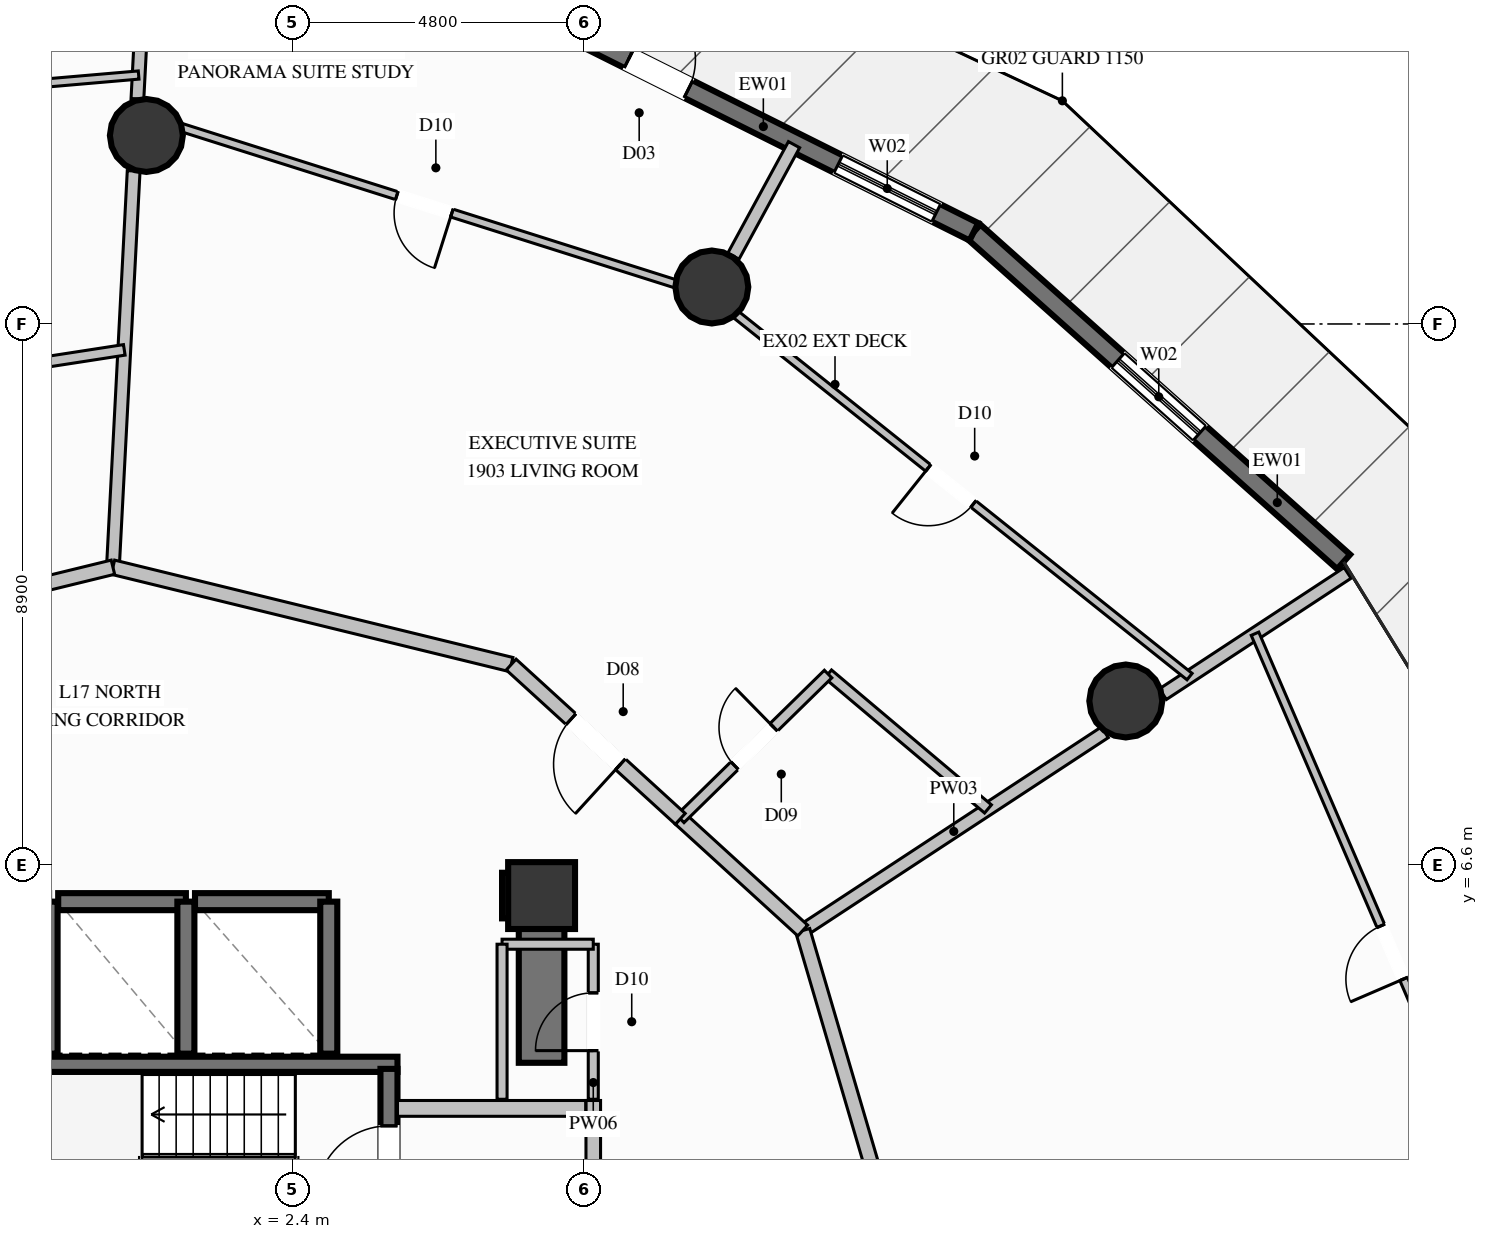
"""IFC4 building model, lengths in metres.
Left out: names, types, materials, properties, quantities, classifications, styles, units other than length and angle.
Written with IfcOpenShell. Run it as: python <this file> out.ifc"""

import sys

from ifc_helpers import new_model, si_unit, direction, frame, frame_2d, origin, origin_2d, place, context, subcontext, project, spatial, rectangle, circle, extrude, element, fill, save


model = new_model("IFC4")
c1 = context("Model", 3, precision=1e-05, world=origin(), true_north=direction((0.0, 1.0)))
c2 = subcontext(c1, "Body", "Model", "MODEL_VIEW")
j1 = project(units=[si_unit("LENGTHUNIT", "METRE"), si_unit("PLANEANGLEUNIT", "RADIAN")], contexts=[c1])
p1 = place(None, origin())
s1 = spatial("IfcSite", under=j1, at=p1, CompositionType="ELEMENT")
p2 = place(p1, origin())
s2 = spatial("IfcBuilding", under=s1, at=p2, CompositionType="ELEMENT")
p3 = place(p2, frame((0.0, 0.0, 71.6)))
s3 = spatial("IfcBuildingStorey", under=s2, at=p3, CompositionType="ELEMENT", Elevation=71.6)
p4 = place(p3, frame((6.5, 6.1, 0.0), z_axis=(0.0, 0.0, 1.0), x_axis=(1.0, 0.0, 0.0)))
e1 = element("IfcColumn", 1, at=p4, inside=s3, PredefinedType="COLUMN", context=c2, shape_type="SweptSolid", body=[
    extrude(rectangle(XDim=1.1, YDim=1.1, at=origin_2d()), origin(), (0.0, 0.0, 1.0), 3.6),
])
p5 = place(p3, frame((-4.13, 3.325, 0.0), z_axis=(0.0, 0.0, 1.0), x_axis=(1.0, 0.0, 0.0)))
e2 = element("IfcWall", 2, at=p5, inside=s3, PredefinedType="SOLIDWALL", context=c2, shape_type="SweptSolid", body=[
    extrude(rectangle(XDim=8.26, YDim=0.25, at=frame_2d((4.13, 0.0))), origin(), (0.0, 0.0, 1.0), 3.6),
])
p6 = place(p3, frame((5.85, 6.1, 0.0), z_axis=(0.0, 0.0, 1.0), x_axis=(1.0, 0.0, 0.0)))
e3 = element("IfcWall", 3, at=p6, inside=s3, PredefinedType="SHEAR", context=c2, shape_type="SweptSolid", body=[
    extrude(rectangle(XDim=0.275, YDim=0.75, at=frame_2d((0.137, 0.0))), origin(), (0.0, 0.0, 1.0), 3.6),
])
p7 = place(p3, frame((6.5, 3.35, 0.0), z_axis=(0.0, 0.0, 1.0), x_axis=(0.0, 1.0, 0.0)))
e4 = element("IfcWall", 4, at=p7, inside=s3, PredefinedType="SHEAR", context=c2, shape_type="SweptSolid", body=[
    extrude(rectangle(XDim=3.125, YDim=0.75, at=frame_2d((1.562, 0.0))), origin(), (0.0, 0.0, 1.0), 3.6),
])
for number, where, z_axis, x_axis in (
    (5, (16.108, 9.3, 0.0), (0.0, 0.0, 1.0), (1.0, 0.0, 0.0)),
    (6, (9.3, 16.108, 0.0), (0.0, 0.0, 1.0), (1.0, 0.0, 0.0)),
    (7, (0.0, 18.6, 0.0), (0.0, 0.0, 1.0), (1.0, 0.0, 0.0)),
):
    element("IfcColumn", number, at=place(p3, frame(where, z_axis=z_axis, x_axis=x_axis)), inside=s3, PredefinedType="COLUMN", context=c2, shape_type="SweptSolid", body=[
        extrude(circle(Radius=0.6, at=origin_2d()), origin(), (0.0, 0.0, 1.0), 3.6),
    ])
p8 = place(p3, frame((13.61, 17.016, 0.0), z_axis=(0.0, 0.0, 1.0), x_axis=(0.746077425908, -0.665859200245, 0.0)))
e8 = element("IfcWall", 8, at=p8, inside=s3, PredefinedType="SOLIDWALL", context=c2, shape_type="SweptSolid", body=[
    extrude(rectangle(XDim=8.15, YDim=0.32, at=frame_2d((4.075, 0.0))), origin(), (0.0, 0.0, 1.0), 3.34),
])
p9 = place(p8, frame((3.175, 0.0, 0.35)))
e9 = element("IfcOpeningElement", 9, at=p9, cuts=e8, PredefinedType="OPENING", context=c2, shape_type="SweptSolid", body=[
    extrude(rectangle(XDim=1.8, YDim=2.6, at=frame_2d((0.9, 1.3))), frame((0.0, 0.17, 0.0), z_axis=(0.0, -1.0, 0.0), x_axis=(1.0, 0.0, 0.0)), (0.0, 0.0, 1.0), 0.34),
])
p10 = place(p3, frame((6.085, 20.776, 0.0), z_axis=(0.0, 0.0, 1.0), x_axis=(0.894560654667, -0.446946568532, 0.0)))
e10 = element("IfcWall", 10, at=p10, inside=s3, PredefinedType="SOLIDWALL", context=c2, shape_type="SweptSolid", body=[
    extrude(rectangle(XDim=8.412, YDim=0.32, at=frame_2d((4.206, 0.0))), origin(), (0.0, 0.0, 1.0), 3.34),
])
p11 = place(p10, frame((5.919, 0.0, 0.35)))
e11 = element("IfcOpeningElement", 11, at=p11, cuts=e10, PredefinedType="OPENING", context=c2, shape_type="SweptSolid", body=[
    extrude(rectangle(XDim=1.8, YDim=2.6, at=frame_2d((0.9, 1.3))), frame((0.0, 0.17, 0.0), z_axis=(0.0, -1.0, 0.0), x_axis=(1.0, 0.0, 0.0)), (0.0, 0.0, 1.0), 0.34),
])
p12 = place(p10, frame((2.063, 0.0, 0.0)))
e12 = element("IfcOpeningElement", 12, at=p12, cuts=e10, PredefinedType="OPENING", context=c2, shape_type="SweptSolid", body=[
    extrude(rectangle(XDim=1.1, YDim=2.2, at=frame_2d((0.55, 1.1))), frame((0.0, 0.17, 0.0), z_axis=(0.0, -1.0, 0.0), x_axis=(1.0, 0.0, 0.0)), (0.0, 0.0, 1.0), 0.34),
])
p13 = place(p3, frame((-1.6, 3.5, 0.0), z_axis=(0.0, 0.0, 1.0), x_axis=(0.0, 1.0, 0.0)))
e13 = element("IfcWall", 13, at=p13, inside=s3, PredefinedType="SOLIDWALL", context=c2, shape_type="SweptSolid", body=[
    extrude(rectangle(XDim=2.5, YDim=0.28, at=frame_2d((1.25, 0.0))), origin(), (0.0, 0.0, 1.0), 3.34),
])
p14 = place(p3, frame((0.65, 6.0, 0.0), z_axis=(0.0, 0.0, 1.0), x_axis=(-1.0, 0.0, 0.0)))
e14 = element("IfcWall", 14, at=p14, inside=s3, PredefinedType="SOLIDWALL", context=c2, shape_type="SweptSolid", body=[
    extrude(rectangle(XDim=2.1, YDim=0.28, at=frame_2d((1.05, 0.0))), origin(), (0.0, 0.0, 1.0), 3.34),
])
p15 = place(p3, frame((0.65, 3.5, 0.0), z_axis=(0.0, 0.0, 1.0), x_axis=(0.0, 1.0, 0.0)))
e15 = element("IfcWall", 15, at=p15, inside=s3, PredefinedType="SOLIDWALL", context=c2, shape_type="SweptSolid", body=[
    extrude(rectangle(XDim=2.5, YDim=0.28, at=frame_2d((1.25, 0.0))), origin(), (0.0, 0.0, 1.0), 3.34),
])
p16 = place(p3, frame((3.0, 6.0, 0.0), z_axis=(0.0, 0.0, 1.0), x_axis=(-1.0, 0.0, 0.0)))
e16 = element("IfcWall", 16, at=p16, inside=s3, PredefinedType="SOLIDWALL", context=c2, shape_type="SweptSolid", body=[
    extrude(rectangle(XDim=2.2, YDim=0.28, at=frame_2d((1.1, 0.0))), origin(), (0.0, 0.0, 1.0), 3.34),
])
p17 = place(p3, frame((3.0, 3.5, 0.0), z_axis=(0.0, 0.0, 1.0), x_axis=(0.0, 1.0, 0.0)))
e17 = element("IfcWall", 17, at=p17, inside=s3, PredefinedType="SOLIDWALL", context=c2, shape_type="SweptSolid", body=[
    extrude(rectangle(XDim=2.5, YDim=0.28, at=frame_2d((1.25, 0.0))), origin(), (0.0, 0.0, 1.0), 3.34),
])
p18 = place(p3, frame((3.99, -2.21, 0.0), z_axis=(0.0, 0.0, 1.0), x_axis=(0.0, 1.0, 0.0)))
e18 = element("IfcWall", 18, at=p18, inside=s3, PredefinedType="SOLIDWALL", context=c2, shape_type="SweptSolid", body=[
    extrude(rectangle(XDim=5.46, YDim=0.28, at=frame_2d((2.73, 0.0))), origin(), (0.0, 0.0, 1.0), 3.34),
])
p19 = place(p18, frame((3.323, 0.0, 0.0)))
e19 = element("IfcOpeningElement", 19, at=p19, cuts=e18, PredefinedType="OPENING", context=c2, shape_type="SweptSolid", body=[
    extrude(rectangle(XDim=1.2, YDim=2.2, at=frame_2d((0.6, 1.1))), frame((0.0, 0.15, 0.0), z_axis=(0.0, -1.0, 0.0), x_axis=(1.0, 0.0, 0.0)), (0.0, 0.0, 1.0), 0.3),
])
p20 = place(p3, frame((7.35, -2.34, 0.0), z_axis=(0.0, 0.0, 1.0), x_axis=(0.0, 1.0, 0.0)))
e20 = element("IfcWall", 20, at=p20, inside=s3, PredefinedType="PARTITIONING", context=c2, shape_type="SweptSolid", body=[
    extrude(rectangle(XDim=5.07, YDim=0.24, at=frame_2d((2.535, 0.0))), origin(), (0.0, 0.0, 1.0), 2.425),
])
p21 = place(p20, frame((2.548, 0.0, 0.0)))
e21 = element("IfcOpeningElement", 21, at=p21, cuts=e20, PredefinedType="OPENING", context=c2, shape_type="SweptSolid", body=[
    extrude(rectangle(XDim=1.15, YDim=2.2, at=frame_2d((0.575, 1.1))), frame((0.0, 0.13, 0.0), z_axis=(0.0, -1.0, 0.0), x_axis=(1.0, 0.0, 0.0)), (0.0, 0.0, 1.0), 0.26),
])
p22 = place(p3, frame((4.13, 2.6, 0.0), z_axis=(0.0, 0.0, 1.0), x_axis=(1.0, 0.0, 0.0)))
e22 = element("IfcWall", 22, at=p22, inside=s3, PredefinedType="PARTITIONING", context=c2, shape_type="SweptSolid", body=[
    extrude(rectangle(XDim=3.095, YDim=0.26, at=frame_2d((1.548, 0.0))), origin(), (0.0, 0.0, 1.0), 3.34),
])
p23 = place(p3, frame((7.35, 2.75, 0.0), z_axis=(0.0, 0.0, 1.0), x_axis=(0.0, 1.0, 0.0)))
e23 = element("IfcWall", 23, at=p23, inside=s3, PredefinedType="PARTITIONING", context=c2, shape_type="SweptSolid", body=[
    extrude(rectangle(XDim=2.55, YDim=0.165, at=frame_2d((1.275, 0.0))), origin(), (0.0, 0.0, 1.0), 3.34),
])
p24 = place(p23, frame((0.8, 0.0, 0.0)))
e24 = element("IfcOpeningElement", 24, at=p24, cuts=e23, PredefinedType="OPENING", context=c2, shape_type="SweptSolid", body=[
    extrude(rectangle(XDim=0.95, YDim=2.1, at=frame_2d((0.475, 1.05))), frame((0.0, 0.093, 0.0), z_axis=(0.0, -1.0, 0.0), x_axis=(1.0, 0.0, 0.0)), (0.0, 0.0, 1.0), 0.185),
])
p25 = place(p3, frame((7.35, 5.3, 0.0), z_axis=(0.0, 0.0, 1.0), x_axis=(-1.0, 0.0, 0.0)))
e25 = element("IfcWall", 25, at=p25, inside=s3, PredefinedType="PARTITIONING", context=c2, shape_type="SweptSolid", body=[
    extrude(rectangle(XDim=1.5, YDim=0.165, at=frame_2d((0.75, 0.0))), origin(), (0.0, 0.0, 1.0), 2.425),
])
p26 = place(p3, frame((5.85, 5.3, 0.0), z_axis=(0.0, 0.0, 1.0), x_axis=(0.0, -1.0, 0.0)))
e26 = element("IfcWall", 26, at=p26, inside=s3, PredefinedType="PARTITIONING", context=c2, shape_type="SweptSolid", body=[
    extrude(rectangle(XDim=2.55, YDim=0.165, at=frame_2d((1.275, 0.0))), origin(), (0.0, 0.0, 1.0), 2.425),
])
p27 = place(p3, frame((10.795, 5.525, 0.0), z_axis=(0.0, 0.0, 1.0), x_axis=(0.836067345727, 0.548626825273, 0.0)))
e27 = element("IfcWall", 27, at=p27, inside=s3, PredefinedType="PARTITIONING", context=c2, shape_type="SweptSolid", body=[
    extrude(rectangle(XDim=5.942, YDim=0.21, at=frame_2d((2.971, 0.0))), origin(), (0.0, 0.0, 1.0), 2.709),
])
p28 = place(p3, frame((16.718, 9.412, 0.0), z_axis=(0.0, 0.0, 1.0), x_axis=(0.836028649588, 0.548685790838, 0.0)))
e28 = element("IfcWall", 28, at=p28, inside=s3, PredefinedType="PARTITIONING", context=c2, shape_type="SweptSolid", body=[
    extrude(rectangle(XDim=3.634, YDim=0.21, at=frame_2d((1.817, 0.0))), origin(), (0.0, 0.0, 1.0), 3.34),
])
p29 = place(p3, frame((-0.55, 11.5, 0.0), z_axis=(0.0, 0.0, 1.0), x_axis=(0.052270148933, 0.998632981395, 0.0)))
e29 = element("IfcWall", 29, at=p29, inside=s3, PredefinedType="PARTITIONING", context=c2, shape_type="SweptSolid", body=[
    extrude(rectangle(XDim=6.525, YDim=0.21, at=frame_2d((3.263, 0.0))), origin(), (0.0, 0.0, 1.0), 3.34),
])
p30 = place(p3, frame((-0.147, 19.202, 0.0), z_axis=(0.0, 0.0, 1.0), x_axis=(0.052230954764, 0.998635032114, 0.0)))
e30 = element("IfcWall", 30, at=p30, inside=s3, PredefinedType="PARTITIONING", context=c2, shape_type="SweptSolid", body=[
    extrude(rectangle(XDim=2.814, YDim=0.21, at=frame_2d((1.407, 0.0))), origin(), (0.0, 0.0, 1.0), 3.34),
])
p31 = place(p3, frame((12.55, -0.45, 0.0), z_axis=(0.0, 0.0, 1.0), x_axis=(-0.281843679574, 0.959460338046, 0.0)))
e31 = element("IfcWall", 31, at=p31, inside=s3, PredefinedType="PARTITIONING", context=c2, shape_type="SweptSolid", body=[
    extrude(rectangle(XDim=6.227, YDim=0.24, at=frame_2d((3.114, 0.0))), origin(), (0.0, 0.0, 1.0), 2.917),
])
p32 = place(p3, frame((22.747, -0.077, 0.0), z_axis=(0.0, 0.0, 1.0), x_axis=(-0.395508976522, 0.918462111081, 0.0)))
e32 = element("IfcWall", 32, at=p32, inside=s3, PredefinedType="PARTITIONING", context=c2, shape_type="SweptSolid", body=[
    extrude(rectangle(XDim=11.414, YDim=0.135, at=frame_2d((5.707, 0.0))), origin(), (0.0, 0.0, 1.0), 3.34),
])
p33 = place(p32, frame((5.232, 0.0, 0.0)))
e33 = element("IfcOpeningElement", 33, at=p33, cuts=e32, PredefinedType="OPENING", context=c2, shape_type="SweptSolid", body=[
    extrude(rectangle(XDim=0.95, YDim=2.1, at=frame_2d((0.475, 1.05))), frame((0.0, 0.078, 0.0), z_axis=(0.0, -1.0, 0.0), x_axis=(1.0, 0.0, 0.0)), (0.0, 0.0, 1.0), 0.155),
])
p34 = place(p3, frame((10.795, 5.525, 0.0), z_axis=(0.0, 0.0, 1.0), x_axis=(-0.738784017848, 0.673942263827, 0.0)))
e34 = element("IfcWall", 34, at=p34, inside=s3, PredefinedType="PARTITIONING", context=c2, shape_type="SweptSolid", body=[
    extrude(rectangle(XDim=2.726, YDim=0.24, at=frame_2d((1.363, 0.0))), origin(), (0.0, 0.0, 1.0), 3.34),
])
p35 = place(p3, frame((13.842, 7.525, 0.0), z_axis=(0.0, 0.0, 1.0), x_axis=(-0.764456493043, 0.644675321572, 0.0)))
e35 = element("IfcWall", 35, at=p35, inside=s3, PredefinedType="PLUMBINGWALL", context=c2, shape_type="SweptSolid", body=[
    extrude(rectangle(XDim=3.44, YDim=0.175, at=frame_2d((1.72, 0.0))), origin(), (0.0, 0.0, 1.0), 3.34),
])
p36 = place(p3, frame((8.781, 7.362, 0.0), z_axis=(0.0, 0.0, 1.0), x_axis=(0.71442299397, 0.699714074238, 0.0)))
e36 = element("IfcWall", 36, at=p36, inside=s3, PredefinedType="PLUMBINGWALL", context=c2, shape_type="SweptSolid", body=[
    extrude(rectangle(XDim=3.403, YDim=0.175, at=frame_2d((1.701, 0.0))), origin(), (0.0, 0.0, 1.0), 2.709),
])
p37 = place(p36, frame((1.251, 0.0, 0.0)))
e37 = element("IfcOpeningElement", 37, at=p37, cuts=e36, PredefinedType="OPENING", context=c2, shape_type="SweptSolid", body=[
    extrude(rectangle(XDim=0.9, YDim=2.1, at=frame_2d((0.45, 1.05))), frame((0.0, 0.098, 0.0), z_axis=(0.0, -1.0, 0.0), x_axis=(1.0, 0.0, 0.0)), (0.0, 0.0, 1.0), 0.195),
])
p38 = place(p3, frame((9.655, 16.616, 0.0), z_axis=(0.0, 0.0, 1.0), x_axis=(0.477835310057, 0.878449438763, 0.0)))
e38 = element("IfcWall", 38, at=p38, inside=s3, PredefinedType="PARTITIONING", context=c2, shape_type="SweptSolid", body=[
    extrude(rectangle(XDim=2.087, YDim=0.21, at=frame_2d((1.043, 0.0))), origin(), (0.0, 0.0, 1.0), 3.34),
])
p39 = place(p3, frame((6.0, 9.899, 0.0), z_axis=(0.0, 0.0, 1.0), x_axis=(-0.971400676792, 0.237446257348, 0.0)))
e39 = element("IfcWall", 39, at=p39, inside=s3, PredefinedType="PARTITIONING", context=c2, shape_type="SweptSolid", body=[
    extrude(rectangle(XDim=6.743, YDim=0.24, at=frame_2d((3.372, 0.0))), origin(), (0.0, 0.0, 1.0), 2.917),
])
p40 = place(p3, frame((8.781, 7.362, 0.0), z_axis=(0.0, 0.0, 1.0), x_axis=(-0.738791518375, 0.673934041562, 0.0)))
e40 = element("IfcWall", 40, at=p40, inside=s3, PredefinedType="PARTITIONING", context=c2, shape_type="SweptSolid", body=[
    extrude(rectangle(XDim=3.764, YDim=0.24, at=frame_2d((1.882, 0.0))), origin(), (0.0, 0.0, 1.0), 3.34),
])
p41 = place(p40, frame((1.332, 0.0, 0.0)))
e41 = element("IfcOpeningElement", 41, at=p41, cuts=e40, PredefinedType="OPENING", context=c2, shape_type="SweptSolid", body=[
    extrude(rectangle(XDim=1.1, YDim=2.3, at=frame_2d((0.55, 1.15))), frame((0.0, 0.13, 0.0), z_axis=(0.0, -1.0, 0.0), x_axis=(1.0, 0.0, 0.0)), (0.0, 0.0, 1.0), 0.26),
])
p42 = place(p3, frame((17.157, 9.701, 0.0), z_axis=(0.0, 0.0, 1.0), x_axis=(-0.78155569477, 0.623835471878, 0.0)))
e42 = element("IfcWall", 42, at=p42, inside=s3, PredefinedType="PARTITIONING", context=c2, shape_type="SweptSolid", body=[
    extrude(rectangle(XDim=10.049, YDim=0.135, at=frame_2d((5.024, 0.0))), origin(), (0.0, 0.0, 1.0), 2.793),
])
p43 = place(p42, frame((4.55, 0.0, 0.0)))
e43 = element("IfcOpeningElement", 43, at=p43, cuts=e42, PredefinedType="OPENING", context=c2, shape_type="SweptSolid", body=[
    extrude(rectangle(XDim=0.95, YDim=2.1, at=frame_2d((0.475, 1.05))), frame((0.0, 0.078, 0.0), z_axis=(0.0, -1.0, 0.0), x_axis=(1.0, 0.0, 0.0)), (0.0, 0.0, 1.0), 0.155),
])
p44 = place(p3, frame((9.303, 15.97, 0.0), z_axis=(0.0, 0.0, 1.0), x_axis=(-0.953412993278, 0.301668135953, 0.0)))
e44 = element("IfcWall", 44, at=p44, inside=s3, PredefinedType="PARTITIONING", context=c2, shape_type="SweptSolid", body=[
    extrude(rectangle(XDim=9.925, YDim=0.135, at=frame_2d((4.963, 0.0))), origin(), (0.0, 0.0, 1.0), 2.793),
])
p45 = place(p44, frame((4.488, 0.0, 0.0)))
e45 = element("IfcOpeningElement", 45, at=p45, cuts=e44, PredefinedType="OPENING", context=c2, shape_type="SweptSolid", body=[
    extrude(rectangle(XDim=0.95, YDim=2.1, at=frame_2d((0.475, 1.05))), frame((0.0, 0.078, 0.0), z_axis=(0.0, -1.0, 0.0), x_axis=(1.0, 0.0, 0.0)), (0.0, 0.0, 1.0), 0.155),
])
p46 = place(p3, frame((-0.55, 11.5, 0.0), z_axis=(0.0, 0.0, 1.0), x_axis=(-0.971426839663, -0.237339198579, 0.0)))
e46 = element("IfcWall", 46, at=p46, inside=s3, PredefinedType="PARTITIONING", context=c2, shape_type="SweptSolid", body=[
    extrude(rectangle(XDim=2.832, YDim=0.24, at=frame_2d((1.416, 0.0))), origin(), (0.0, 0.0, 1.0), 2.917),
])
p47 = place(p3, frame((-0.363, 15.074, 0.0), z_axis=(0.0, 0.0, 1.0), x_axis=(-0.988289486539, -0.152590598654, 0.0)))
e47 = element("IfcWall", 47, at=p47, inside=s3, PredefinedType="PLUMBINGWALL", context=c2, shape_type="SweptSolid", body=[
    extrude(rectangle(XDim=3.611, YDim=0.175, at=frame_2d((1.806, 0.0))), origin(), (0.0, 0.0, 1.0), 3.34),
])
p48 = place(p3, frame((-0.127, 19.594, 0.0), z_axis=(0.0, 0.0, 1.0), x_axis=(-0.99630221434, -0.085917970765, 0.0)))
e48 = element("IfcWall", 48, at=p48, inside=s3, PredefinedType="PARTITIONING", context=c2, shape_type="SweptSolid", body=[
    extrude(rectangle(XDim=11.0, YDim=0.135, at=frame_2d((5.5, 0.0))), origin(), (0.0, 0.0, 1.0), 3.34),
])
p49 = place(p48, frame((5.025, 0.0, 0.0)))
e49 = element("IfcOpeningElement", 49, at=p49, cuts=e48, PredefinedType="OPENING", context=c2, shape_type="SweptSolid", body=[
    extrude(rectangle(XDim=0.95, YDim=2.1, at=frame_2d((0.475, 1.05))), frame((0.0, 0.078, 0.0), z_axis=(0.0, -1.0, 0.0), x_axis=(1.0, 0.0, 0.0)), (0.0, 0.0, 1.0), 0.155),
])
p50 = place(p9, origin())
e50 = element("IfcWindow", 50, at=p50, inside=s3, PartitioningType="SINGLE_PANEL", PredefinedType="WINDOW", context=c2, shape_type="SweptSolid", body=[
    extrude(rectangle(XDim=1.8, YDim=2.6, at=frame_2d((0.9, 1.3))), frame((0.0, 0.03, 0.0), z_axis=(0.0, -1.0, 0.0), x_axis=(1.0, 0.0, 0.0)), (0.0, 0.0, 1.0), 0.06),
])
fill(e9, e50)
p51 = place(p11, origin())
e51 = element("IfcWindow", 51, at=p51, inside=s3, PartitioningType="SINGLE_PANEL", PredefinedType="WINDOW", context=c2, shape_type="SweptSolid", body=[
    extrude(rectangle(XDim=1.8, YDim=2.6, at=frame_2d((0.9, 1.3))), frame((0.0, 0.03, 0.0), z_axis=(0.0, -1.0, 0.0), x_axis=(1.0, 0.0, 0.0)), (0.0, 0.0, 1.0), 0.06),
])
fill(e11, e51)
p52 = place(p12, origin())
e52 = element("IfcDoor", 52, at=p52, inside=s3, OperationType="SINGLE_SWING_LEFT", PredefinedType="DOOR", context=c2, shape_type="SweptSolid", body=[
    extrude(rectangle(XDim=1.1, YDim=2.2, at=frame_2d((0.55, 1.1))), frame((0.0, 0.025, 0.0), z_axis=(0.0, -1.0, 0.0), x_axis=(1.0, 0.0, 0.0)), (0.0, 0.0, 1.0), 0.05),
])
fill(e12, e52)
p53 = place(p19, origin())
e53 = element("IfcDoor", 53, at=p53, inside=s3, OperationType="SINGLE_SWING_LEFT", PredefinedType="DOOR", context=c2, shape_type="SweptSolid", body=[
    extrude(rectangle(XDim=1.2, YDim=2.2, at=frame_2d((0.6, 1.1))), frame((0.0, 0.025, 0.0), z_axis=(0.0, -1.0, 0.0), x_axis=(1.0, 0.0, 0.0)), (0.0, 0.0, 1.0), 0.05),
])
fill(e19, e53)
p54 = place(p24, origin())
e54 = element("IfcDoor", 54, at=p54, inside=s3, OperationType="SINGLE_SWING_LEFT", PredefinedType="DOOR", context=c2, shape_type="SweptSolid", body=[
    extrude(rectangle(XDim=0.95, YDim=2.1, at=frame_2d((0.475, 1.05))), frame((0.0, 0.025, 0.0), z_axis=(0.0, -1.0, 0.0), x_axis=(1.0, 0.0, 0.0)), (0.0, 0.0, 1.0), 0.05),
])
fill(e24, e54)
p55 = place(p33, origin())
e55 = element("IfcDoor", 55, at=p55, inside=s3, OperationType="SINGLE_SWING_LEFT", PredefinedType="DOOR", context=c2, shape_type="SweptSolid", body=[
    extrude(rectangle(XDim=0.95, YDim=2.1, at=frame_2d((0.475, 1.05))), frame((0.0, 0.025, 0.0), z_axis=(0.0, -1.0, 0.0), x_axis=(1.0, 0.0, 0.0)), (0.0, 0.0, 1.0), 0.05),
])
fill(e33, e55)
p56 = place(p37, origin())
e56 = element("IfcDoor", 56, at=p56, inside=s3, OperationType="SINGLE_SWING_RIGHT", PredefinedType="DOOR", context=c2, shape_type="SweptSolid", body=[
    extrude(rectangle(XDim=0.9, YDim=2.1, at=frame_2d((0.45, 1.05))), frame((0.0, 0.025, 0.0), z_axis=(0.0, -1.0, 0.0), x_axis=(1.0, 0.0, 0.0)), (0.0, 0.0, 1.0), 0.05),
])
fill(e37, e56)
p57 = place(p41, origin())
e57 = element("IfcDoor", 57, at=p57, inside=s3, OperationType="SINGLE_SWING_LEFT", PredefinedType="DOOR", context=c2, shape_type="SweptSolid", body=[
    extrude(rectangle(XDim=1.1, YDim=2.3, at=frame_2d((0.55, 1.15))), frame((0.0, 0.025, 0.0), z_axis=(0.0, -1.0, 0.0), x_axis=(1.0, 0.0, 0.0)), (0.0, 0.0, 1.0), 0.05),
])
fill(e41, e57)
p58 = place(p43, origin())
e58 = element("IfcDoor", 58, at=p58, inside=s3, OperationType="SINGLE_SWING_RIGHT", PredefinedType="DOOR", context=c2, shape_type="SweptSolid", body=[
    extrude(rectangle(XDim=0.95, YDim=2.1, at=frame_2d((0.475, 1.05))), frame((0.0, 0.025, 0.0), z_axis=(0.0, -1.0, 0.0), x_axis=(1.0, 0.0, 0.0)), (0.0, 0.0, 1.0), 0.05),
])
fill(e43, e58)
p59 = place(p45, origin())
e59 = element("IfcDoor", 59, at=p59, inside=s3, OperationType="SINGLE_SWING_LEFT", PredefinedType="DOOR", context=c2, shape_type="SweptSolid", body=[
    extrude(rectangle(XDim=0.95, YDim=2.1, at=frame_2d((0.475, 1.05))), frame((0.0, 0.025, 0.0), z_axis=(0.0, -1.0, 0.0), x_axis=(1.0, 0.0, 0.0)), (0.0, 0.0, 1.0), 0.05),
])
fill(e45, e59)
save(model, sys.argv[1])
